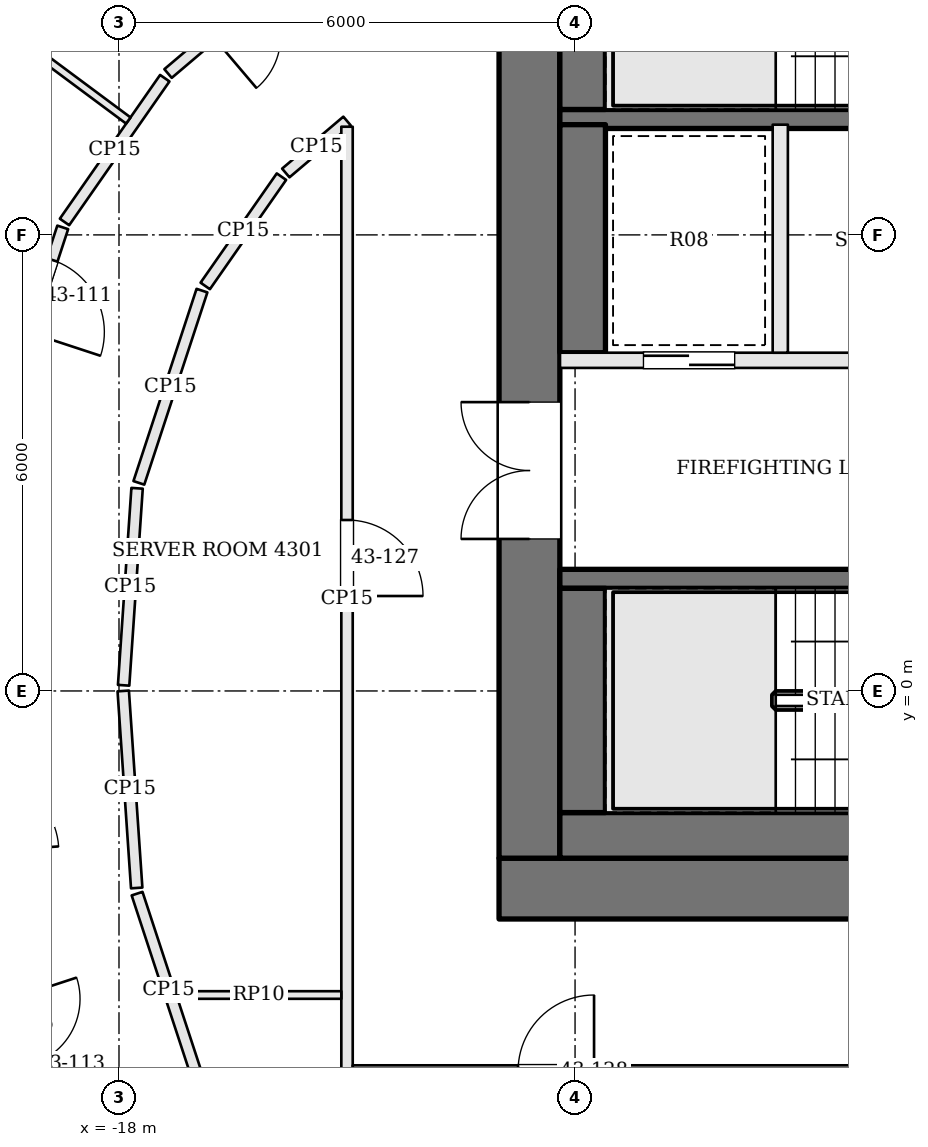
"""IFC4 building model, lengths in metres.
Left out: names, types, materials, properties, quantities, classifications, styles, units other than length and angle.
Written with IfcOpenShell. Run it as: python <this file> out.ifc"""

import sys

from ifc_helpers import new_model, si_unit, direction, frame, frame_2d, origin, place, context, subcontext, project, spatial, rectangle, extrude, element, fill, save


model = new_model("IFC4")
c1 = context("Model", 3, precision=1e-05, world=origin(), true_north=direction((0.0, 1.0)))
c2 = subcontext(c1, "Body", "Model", "MODEL_VIEW")
j1 = project(units=[si_unit("LENGTHUNIT", "METRE"), si_unit("PLANEANGLEUNIT", "RADIAN")], contexts=[c1])
p1 = place(None, origin())
s1 = spatial("IfcSite", under=j1, at=p1, CompositionType="ELEMENT")
p2 = place(p1, origin())
s2 = spatial("IfcBuilding", under=s1, at=p2, CompositionType="ELEMENT")
p3 = place(p2, frame((0.0, 0.0, 177.9)))
s3 = spatial("IfcBuildingStorey", under=s2, at=p3, CompositionType="ELEMENT", Elevation=177.9)
p4 = place(p3, frame((-13.0, -2.6, 0.0), z_axis=(0.0, 0.0, 1.0), x_axis=(1.0, 0.0, 0.0)))
e1 = element("IfcWall", 1, at=p4, inside=s3, PredefinedType="SHEAR", context=c2, shape_type="SweptSolid", body=[
    extrude(rectangle(XDim=26.0, YDim=0.8, at=frame_2d((13.0, 0.0))), origin(), (0.0, 0.0, 1.0), 3.9),
])
p5 = place(p4, frame((8.925, 0.0, 0.0)))
e2 = element("IfcOpeningElement", 2, at=p5, cuts=e1, PredefinedType="OPENING", context=c2, shape_type="SweptSolid", body=[
    extrude(rectangle(XDim=0.9, YDim=2.1, at=frame_2d((0.45, 1.05))), frame((0.0, 0.41, 0.0), z_axis=(0.0, -1.0, 0.0), x_axis=(1.0, 0.0, 0.0)), (0.0, 0.0, 1.0), 0.82),
])
p6 = place(p4, frame((11.475, 0.0, 0.0)))
e3 = element("IfcOpeningElement", 3, at=p6, cuts=e1, PredefinedType="OPENING", context=c2, shape_type="SweptSolid", body=[
    extrude(rectangle(XDim=0.9, YDim=2.1, at=frame_2d((0.45, 1.05))), frame((0.0, 0.41, 0.0), z_axis=(0.0, -1.0, 0.0), x_axis=(1.0, 0.0, 0.0)), (0.0, 0.0, 1.0), 0.82),
])
p7 = place(p4, frame((13.6, 0.0, 0.0)))
e4 = element("IfcOpeningElement", 4, at=p7, cuts=e1, PredefinedType="OPENING", context=c2, shape_type="SweptSolid", body=[
    extrude(rectangle(XDim=1.0, YDim=2.1, at=frame_2d((0.5, 1.05))), frame((0.0, 0.41, 0.0), z_axis=(0.0, -1.0, 0.0), x_axis=(1.0, 0.0, 0.0)), (0.0, 0.0, 1.0), 0.82),
])
p8 = place(p4, frame((15.95, 0.0, 0.0)))
e5 = element("IfcOpeningElement", 5, at=p8, cuts=e1, PredefinedType="OPENING", context=c2, shape_type="SweptSolid", body=[
    extrude(rectangle(XDim=1.0, YDim=2.1, at=frame_2d((0.5, 1.05))), frame((0.0, 0.41, 0.0), z_axis=(0.0, -1.0, 0.0), x_axis=(1.0, 0.0, 0.0)), (0.0, 0.0, 1.0), 0.82),
])
p9 = place(p3, frame((-12.6, -2.2, 0.0), z_axis=(0.0, 0.0, 1.0), x_axis=(0.0, 1.0, 0.0)))
e6 = element("IfcWall", 6, at=p9, inside=s3, PredefinedType="SHEAR", context=c2, shape_type="SweptSolid", body=[
    extrude(rectangle(XDim=13.4, YDim=0.8, at=frame_2d((6.7, 0.0))), origin(), (0.0, 0.0, 1.0), 3.9),
])
p10 = place(p9, frame((4.2, 0.0, 0.0)))
e7 = element("IfcOpeningElement", 7, at=p10, cuts=e6, PredefinedType="OPENING", context=c2, shape_type="SweptSolid", body=[
    extrude(rectangle(XDim=1.8, YDim=2.1, at=frame_2d((0.9, 1.05))), frame((0.0, 0.41, 0.0), z_axis=(0.0, -1.0, 0.0), x_axis=(1.0, 0.0, 0.0)), (0.0, 0.0, 1.0), 0.82),
])
p11 = place(p3, frame((-12.2, 1.475, 0.0), z_axis=(0.0, 0.0, 1.0), x_axis=(1.0, 0.0, 0.0)))
e8 = element("IfcWall", 8, at=p11, inside=s3, PredefinedType="SOLIDWALL", context=c2, shape_type="SweptSolid", body=[
    extrude(rectangle(XDim=7.1, YDim=0.25, at=frame_2d((3.55, 0.0))), origin(), (0.0, 0.0, 1.0), 3.7),
])
p12 = place(p11, frame((5.8, 0.0, 0.0)))
e9 = element("IfcOpeningElement", 9, at=p12, cuts=e8, PredefinedType="OPENING", context=c2, shape_type="SweptSolid", body=[
    extrude(rectangle(XDim=1.2, YDim=2.1, at=frame_2d((0.6, 1.05))), frame((0.0, 0.135, 0.0), z_axis=(0.0, -1.0, 0.0), x_axis=(1.0, 0.0, 0.0)), (0.0, 0.0, 1.0), 0.27),
])
p13 = place(p3, frame((-12.2, 4.35, 0.0), z_axis=(0.0, 0.0, 1.0), x_axis=(1.0, 0.0, 0.0)))
e10 = element("IfcWall", 10, at=p13, inside=s3, PredefinedType="SOLIDWALL", context=c2, shape_type="SweptSolid", body=[
    extrude(rectangle(XDim=7.1, YDim=0.2, at=frame_2d((3.55, 0.0))), origin(), (0.0, 0.0, 1.0), 3.7),
])
p14 = place(p13, frame((4.4, 0.0, 0.0)))
e11 = element("IfcOpeningElement", 11, at=p14, cuts=e10, PredefinedType="OPENING", context=c2, shape_type="SweptSolid", body=[
    extrude(rectangle(XDim=1.2, YDim=2.1, at=frame_2d((0.6, 1.05))), frame((0.0, 0.11, 0.0), z_axis=(0.0, -1.0, 0.0), x_axis=(1.0, 0.0, 0.0)), (0.0, 0.0, 1.0), 0.22),
])
p15 = place(p13, frame((1.1, 0.0, 0.0)))
e12 = element("IfcOpeningElement", 12, at=p15, cuts=e10, PredefinedType="OPENING", context=c2, shape_type="SweptSolid", body=[
    extrude(rectangle(XDim=1.2, YDim=2.1, at=frame_2d((0.6, 1.05))), frame((0.0, 0.11, 0.0), z_axis=(0.0, -1.0, 0.0), x_axis=(1.0, 0.0, 0.0)), (0.0, 0.0, 1.0), 0.22),
])
p16 = place(p3, frame((-12.2, 7.525, 0.0), z_axis=(0.0, 0.0, 1.0), x_axis=(1.0, 0.0, 0.0)))
e13 = element("IfcWall", 13, at=p16, inside=s3, PredefinedType="SOLIDWALL", context=c2, shape_type="SweptSolid", body=[
    extrude(rectangle(XDim=7.1, YDim=0.25, at=frame_2d((3.55, 0.0))), origin(), (0.0, 0.0, 1.0), 3.7),
])
p17 = place(p16, frame((5.8, 0.0, 0.0)))
e14 = element("IfcOpeningElement", 14, at=p17, cuts=e13, PredefinedType="OPENING", context=c2, shape_type="SweptSolid", body=[
    extrude(rectangle(XDim=1.2, YDim=2.1, at=frame_2d((0.6, 1.05))), frame((0.0, 0.135, 0.0), z_axis=(0.0, -1.0, 0.0), x_axis=(1.0, 0.0, 0.0)), (0.0, 0.0, 1.0), 0.27),
])
p18 = place(p3, frame((-9.3, 4.45, 0.0), z_axis=(0.0, 0.0, 1.0), x_axis=(0.0, 1.0, 0.0)))
e15 = element("IfcWall", 15, at=p18, inside=s3, PredefinedType="SOLIDWALL", context=c2, shape_type="SweptSolid", body=[
    extrude(rectangle(XDim=3.0, YDim=0.2, at=frame_2d((1.5, 0.0))), origin(), (0.0, 0.0, 1.0), 3.7),
])
p19 = place(p3, frame((-12.2, -1.9, 0.0), z_axis=(0.0, 0.0, 1.0), x_axis=(1.0, 0.0, 0.0)))
e16 = element("IfcWall", 16, at=p19, inside=s3, PredefinedType="SOLIDWALL", context=c2, shape_type="SweptSolid", body=[
    extrude(rectangle(XDim=7.1, YDim=0.6, at=frame_2d((3.55, 0.0))), origin(), (0.0, 0.0, 1.0), 3.7),
])
p20 = place(p3, frame((-11.9, -1.6, 0.0), z_axis=(0.0, 0.0, 1.0), x_axis=(0.0, 1.0, 0.0)))
e17 = element("IfcWall", 17, at=p20, inside=s3, PredefinedType="SOLIDWALL", context=c2, shape_type="SweptSolid", body=[
    extrude(rectangle(XDim=2.95, YDim=0.6, at=frame_2d((1.475, 0.0))), origin(), (0.0, 0.0, 1.0), 3.7),
])
p21 = place(p3, frame((-11.9, 4.45, 0.0), z_axis=(0.0, 0.0, 1.0), x_axis=(0.0, 1.0, 0.0)))
e18 = element("IfcWall", 18, at=p21, inside=s3, PredefinedType="SOLIDWALL", context=c2, shape_type="SweptSolid", body=[
    extrude(rectangle(XDim=3.0, YDim=0.6, at=frame_2d((1.5, 0.0))), origin(), (0.0, 0.0, 1.0), 3.7),
])
p22 = place(p3, frame((-11.9, 7.65, 0.0), z_axis=(0.0, 0.0, 1.0), x_axis=(0.0, 1.0, 0.0)))
e19 = element("IfcWall", 19, at=p22, inside=s3, PredefinedType="SOLIDWALL", context=c2, shape_type="SweptSolid", body=[
    extrude(rectangle(XDim=2.95, YDim=0.6, at=frame_2d((1.475, 0.0))), origin(), (0.0, 0.0, 1.0), 3.7),
])
p23 = place(p3, frame((-15.057, 10.073, 0.0), z_axis=(0.0, 0.0, 1.0), x_axis=(-0.762398905861, -0.647107339119, 0.0)))
e20 = element("IfcWall", 20, at=p23, inside=s3, PredefinedType="PARTITIONING", context=c2, shape_type="SweptSolid", body=[
    extrude(rectangle(XDim=3.013, YDim=0.15, at=frame_2d((1.507, 0.0))), origin(), (0.0, 0.0, 1.0), 3.084),
])
p24 = place(p23, frame((0.45, 0.0, 0.0)))
e21 = element("IfcOpeningElement", 21, at=p24, cuts=e20, PredefinedType="OPENING", context=c2, shape_type="SweptSolid", body=[
    extrude(rectangle(XDim=1.8, YDim=2.1, at=frame_2d((0.9, 1.05))), frame((0.0, 0.085, 0.0), z_axis=(0.0, -1.0, 0.0), x_axis=(1.0, 0.0, 0.0)), (0.0, 0.0, 1.0), 0.17),
])
p25 = place(p3, frame((-17.397, 8.062, 0.0), z_axis=(0.0, 0.0, 1.0), x_axis=(-0.572118665737, -0.820170855563, 0.0)))
e22 = element("IfcWall", 22, at=p25, inside=s3, PredefinedType="PARTITIONING", context=c2, shape_type="SweptSolid", body=[
    extrude(rectangle(XDim=2.306, YDim=0.15, at=frame_2d((1.153, 0.0))), origin(), (0.0, 0.0, 1.0), 3.084),
])
p26 = place(p3, frame((-18.74, 6.099, 0.0), z_axis=(0.0, 0.0, 1.0), x_axis=(-0.31188427026, -0.950120098706, 0.0)))
e23 = element("IfcWall", 23, at=p26, inside=s3, PredefinedType="PARTITIONING", context=c2, shape_type="SweptSolid", body=[
    extrude(rectangle(XDim=3.206, YDim=0.15, at=frame_2d((1.603, 0.0))), origin(), (0.0, 0.0, 1.0), 3.084),
])
p27 = place(p26, frame((0.45, 0.0, 0.0)))
e24 = element("IfcOpeningElement", 24, at=p27, cuts=e23, PredefinedType="OPENING", context=c2, shape_type="SweptSolid", body=[
    extrude(rectangle(XDim=1.0, YDim=2.4, at=frame_2d((0.5, 1.2))), frame((0.0, 0.085, 0.0), z_axis=(0.0, -1.0, 0.0), x_axis=(1.0, 0.0, 0.0)), (0.0, 0.0, 1.0), 0.17),
])
p28 = place(p3, frame((-19.693, -3.196, 0.0), z_axis=(0.0, 0.0, 1.0), x_axis=(0.311918951318, -0.950108713679, 0.0)))
e25 = element("IfcWall", 25, at=p28, inside=s3, PredefinedType="PARTITIONING", context=c2, shape_type="SweptSolid", body=[
    extrude(rectangle(XDim=3.13, YDim=0.15, at=frame_2d((1.565, 0.0))), origin(), (0.0, 0.0, 1.0), 3.084),
])
p29 = place(p28, frame((0.9, 0.0, 0.0)))
e26 = element("IfcOpeningElement", 26, at=p29, cuts=e25, PredefinedType="OPENING", context=c2, shape_type="SweptSolid", body=[
    extrude(rectangle(XDim=1.8, YDim=2.1, at=frame_2d((0.9, 1.05))), frame((0.0, 0.085, 0.0), z_axis=(0.0, -1.0, 0.0), x_axis=(1.0, 0.0, 0.0)), (0.0, 0.0, 1.0), 0.17),
])
p30 = place(p3, frame((-16.932, -5.196, 0.0), z_axis=(0.0, 0.0, 1.0), x_axis=(-0.311904957484, 0.950113307715, 0.0)))
e27 = element("IfcWall", 27, at=p30, inside=s3, PredefinedType="PARTITIONING", context=c2, shape_type="SweptSolid", body=[
    extrude(rectangle(XDim=2.662, YDim=0.15, at=frame_2d((1.331, 0.0))), origin(), (0.0, 0.0, 1.0), 3.084),
])
p31 = place(p3, frame((-17.767, -2.592, 0.0), z_axis=(0.0, 0.0, 1.0), x_axis=(-0.068140828228, 0.997675712608, 0.0)))
e28 = element("IfcWall", 28, at=p31, inside=s3, PredefinedType="PARTITIONING", context=c2, shape_type="SweptSolid", body=[
    extrude(rectangle(XDim=2.598, YDim=0.15, at=frame_2d((1.299, 0.0))), origin(), (0.0, 0.0, 1.0), 3.084),
])
p32 = place(p3, frame((-17.939, 0.075, 0.0), z_axis=(0.0, 0.0, 1.0), x_axis=(0.068227980697, 0.997669756307, 0.0)))
e29 = element("IfcWall", 29, at=p32, inside=s3, PredefinedType="PARTITIONING", context=c2, shape_type="SweptSolid", body=[
    extrude(rectangle(XDim=2.598, YDim=0.15, at=frame_2d((1.299, 0.0))), origin(), (0.0, 0.0, 1.0), 3.084),
])
p33 = place(p3, frame((-17.739, 2.738, 0.0), z_axis=(0.0, 0.0, 1.0), x_axis=(0.311904957484, 0.950113307715, 0.0)))
e30 = element("IfcWall", 30, at=p33, inside=s3, PredefinedType="PARTITIONING", context=c2, shape_type="SweptSolid", body=[
    extrude(rectangle(XDim=2.662, YDim=0.15, at=frame_2d((1.331, 0.0))), origin(), (0.0, 0.0, 1.0), 3.084),
])
p34 = place(p3, frame((-16.865, 5.329, 0.0), z_axis=(0.0, 0.0, 1.0), x_axis=(0.572096615639, 0.820186236397, 0.0)))
e31 = element("IfcWall", 31, at=p34, inside=s3, PredefinedType="PARTITIONING", context=c2, shape_type="SweptSolid", body=[
    extrude(rectangle(XDim=1.753, YDim=0.15, at=frame_2d((0.876, 0.0))), origin(), (0.0, 0.0, 1.0), 3.084),
])
p35 = place(p3, frame((-15.805, 6.814, 0.0), z_axis=(0.0, 0.0, 1.0), x_axis=(0.762298381233, 0.647225755027, 0.0)))
e32 = element("IfcWall", 32, at=p35, inside=s3, PredefinedType="PARTITIONING", context=c2, shape_type="SweptSolid", body=[
    extrude(rectangle(XDim=1.057, YDim=0.15, at=frame_2d((0.528, 0.0))), origin(), (0.0, 0.0, 1.0), 3.084),
])
p36 = place(p3, frame((-15.0, 7.423, 0.0), z_axis=(0.0, 0.0, 1.0), x_axis=(0.0, -1.0, 0.0)))
e33 = element("IfcWall", 33, at=p36, inside=s3, PredefinedType="PARTITIONING", context=c2, shape_type="SweptSolid", body=[
    extrude(rectangle(XDim=12.423, YDim=0.15, at=frame_2d((6.211, 0.0))), origin(), (0.0, 0.0, 1.0), 3.084),
])
p37 = place(p36, frame((5.174, 0.0, 0.0)))
e34 = element("IfcOpeningElement", 34, at=p37, cuts=e33, PredefinedType="OPENING", context=c2, shape_type="SweptSolid", body=[
    extrude(rectangle(XDim=1.0, YDim=2.1, at=frame_2d((0.5, 1.05))), frame((0.0, 0.085, 0.0), z_axis=(0.0, -1.0, 0.0), x_axis=(1.0, 0.0, 0.0)), (0.0, 0.0, 1.0), 0.17),
])
p38 = place(p3, frame((-14.925, -5.0, 0.0), z_axis=(0.0, 0.0, 1.0), x_axis=(1.0, 0.0, 0.0)))
e35 = element("IfcWall", 35, at=p38, inside=s3, PredefinedType="PARTITIONING", context=c2, shape_type="SweptSolid", body=[
    extrude(rectangle(XDim=29.925, YDim=0.15, at=frame_2d((14.962, 0.0))), origin(), (0.0, 0.0, 1.0), 3.084),
])
p39 = place(p38, frame((2.175, 0.0, 0.0)))
e36 = element("IfcOpeningElement", 36, at=p39, cuts=e35, PredefinedType="OPENING", context=c2, shape_type="SweptSolid", body=[
    extrude(rectangle(XDim=1.0, YDim=2.1, at=frame_2d((0.5, 1.05))), frame((0.0, 0.085, 0.0), z_axis=(0.0, -1.0, 0.0), x_axis=(1.0, 0.0, 0.0)), (0.0, 0.0, 1.0), 0.17),
])
p40 = place(p38, frame((14.025, 0.0, 0.0)))
e37 = element("IfcOpeningElement", 37, at=p40, cuts=e35, PredefinedType="OPENING", context=c2, shape_type="SweptSolid", body=[
    extrude(rectangle(XDim=1.8, YDim=2.1, at=frame_2d((0.9, 1.05))), frame((0.0, 0.085, 0.0), z_axis=(0.0, -1.0, 0.0), x_axis=(1.0, 0.0, 0.0)), (0.0, 0.0, 1.0), 0.17),
])
p41 = place(p38, frame((26.675, 0.0, 0.0)))
e38 = element("IfcOpeningElement", 38, at=p41, cuts=e35, PredefinedType="OPENING", context=c2, shape_type="SweptSolid", body=[
    extrude(rectangle(XDim=1.0, YDim=2.1, at=frame_2d((0.5, 1.05))), frame((0.0, 0.085, 0.0), z_axis=(0.0, -1.0, 0.0), x_axis=(1.0, 0.0, 0.0)), (0.0, 0.0, 1.0), 0.17),
])
p42 = place(p3, frame((-17.877, 7.505, 0.0), z_axis=(0.0, 0.0, 1.0), x_axis=(-0.802692989486, 0.596392458563, 0.0)))
e39 = element("IfcWall", 39, at=p42, inside=s3, PredefinedType="PARTITIONING", context=c2, shape_type="SweptSolid", body=[
    extrude(rectangle(XDim=3.677, YDim=0.1, at=frame_2d((1.838, 0.0))), origin(), (0.0, 0.0, 1.0), 3.084),
])
p43 = place(p3, frame((-17.249, -4.0, 0.0), z_axis=(0.0, 0.0, 1.0), x_axis=(1.0, 0.0, 0.0)))
e40 = element("IfcWall", 40, at=p43, inside=s3, PredefinedType="PARTITIONING", context=c2, shape_type="SweptSolid", body=[
    extrude(rectangle(XDim=2.174, YDim=0.1, at=frame_2d((1.087, 0.0))), origin(), (0.0, 0.0, 1.0), 3.084),
])
p44 = place(p10, origin())
e41 = element("IfcDoor", 41, at=p44, inside=s3, OperationType="DOUBLE_DOOR_SINGLE_SWING", PredefinedType="DOOR", context=c2, shape_type="SweptSolid", body=[
    extrude(rectangle(XDim=1.8, YDim=2.1, at=frame_2d((0.9, 1.05))), frame((0.0, 0.025, 0.0), z_axis=(0.0, -1.0, 0.0), x_axis=(1.0, 0.0, 0.0)), (0.0, 0.0, 1.0), 0.05),
])
fill(e7, e41)
p45 = place(p15, origin())
e42 = element("IfcDoor", 42, at=p45, inside=s3, OperationType="SLIDING_TO_RIGHT", PredefinedType="DOOR", context=c2, shape_type="SweptSolid", body=[
    extrude(rectangle(XDim=1.2, YDim=2.1, at=frame_2d((0.6, 1.05))), frame((0.0, 0.025, 0.0), z_axis=(0.0, -1.0, 0.0), x_axis=(1.0, 0.0, 0.0)), (0.0, 0.0, 1.0), 0.05),
])
fill(e12, e42)
p46 = place(p27, origin())
e43 = element("IfcDoor", 43, at=p46, inside=s3, OperationType="SINGLE_SWING_RIGHT", PredefinedType="DOOR", context=c2, shape_type="SweptSolid", body=[
    extrude(rectangle(XDim=1.0, YDim=2.4, at=frame_2d((0.5, 1.2))), frame((0.0, 0.025, 0.0), z_axis=(0.0, -1.0, 0.0), x_axis=(1.0, 0.0, 0.0)), (0.0, 0.0, 1.0), 0.05),
])
fill(e24, e43)
p47 = place(p29, origin())
e44 = element("IfcDoor", 44, at=p47, inside=s3, OperationType="DOUBLE_DOOR_SINGLE_SWING", PredefinedType="DOOR", context=c2, shape_type="SweptSolid", body=[
    extrude(rectangle(XDim=1.8, YDim=2.1, at=frame_2d((0.9, 1.05))), frame((0.0, 0.025, 0.0), z_axis=(0.0, -1.0, 0.0), x_axis=(1.0, 0.0, 0.0)), (0.0, 0.0, 1.0), 0.05),
])
fill(e26, e44)
p48 = place(p37, origin())
e45 = element("IfcDoor", 45, at=p48, inside=s3, OperationType="SINGLE_SWING_RIGHT", PredefinedType="DOOR", context=c2, shape_type="SweptSolid", body=[
    extrude(rectangle(XDim=1.0, YDim=2.1, at=frame_2d((0.5, 1.05))), frame((0.0, 0.025, 0.0), z_axis=(0.0, -1.0, 0.0), x_axis=(1.0, 0.0, 0.0)), (0.0, 0.0, 1.0), 0.05),
])
fill(e34, e45)
save(model, sys.argv[1])
